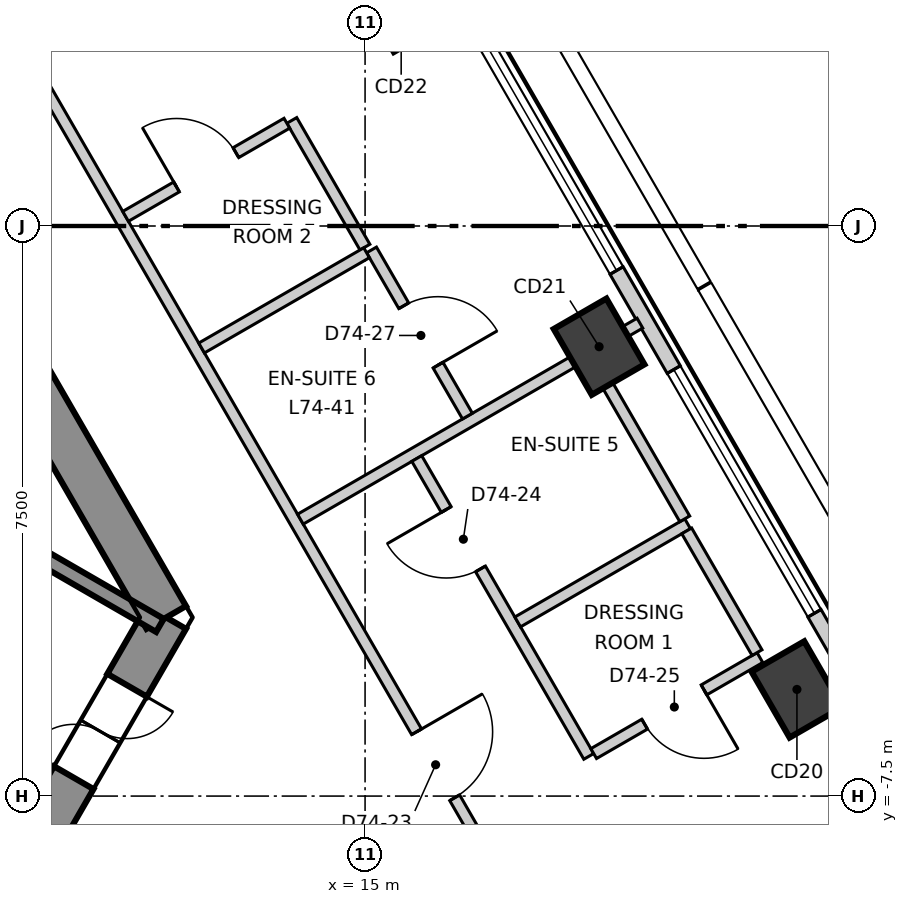
"""IFC4 building model, lengths in metres.
Left out: names, types, materials, properties, quantities, classifications, styles, units other than length and angle.
Written with IfcOpenShell. Run it as: python <this file> out.ifc"""

import sys

from ifc_helpers import new_model, si_unit, direction, frame, frame_2d, origin, origin_2d, place, context, subcontext, project, spatial, polyline, rectangle, outline, extrude, element, fill, save


model = new_model("IFC4")
c1 = context("Model", 3, precision=1e-05, world=origin(), true_north=direction((0.0, 1.0)))
c2 = subcontext(c1, "Body", "Model", "MODEL_VIEW")
j1 = project(units=[si_unit("LENGTHUNIT", "METRE"), si_unit("PLANEANGLEUNIT", "RADIAN")], contexts=[c1])
p1 = place(None, origin())
s1 = spatial("IfcSite", under=j1, at=p1, CompositionType="ELEMENT")
p2 = place(p1, origin())
s2 = spatial("IfcBuilding", under=s1, at=p2, CompositionType="ELEMENT")
p3 = place(p2, frame((0.0, 0.0, 311.5)))
s3 = spatial("IfcBuildingStorey", under=s2, at=p3, CompositionType="ELEMENT", Elevation=311.5)
p4 = place(p3, frame((10.652, -8.15, -0.3), z_axis=(0.0, 0.0, 1.0), x_axis=(0.49997462182, 0.866040055388, 0.0)))
e1 = element("IfcWall", 1, at=p4, inside=s3, PredefinedType="SHEAR", context=c2, shape_type="SweptSolid", body=[
    extrude(outline(polyline([(-0.173, -0.3), (1.732, -0.301), (3.638, -0.301), (3.291, 0.3), (1.732, 0.3), (0.173, 0.3), (-0.173, -0.3)])), origin(), (0.0, 0.0, 1.0), 3.6),
])
p5 = place(p4, frame((1.032, 0.0, 0.3)))
e2 = element("IfcOpeningElement", 2, at=p5, cuts=e1, PredefinedType="OPENING", context=c2, shape_type="SweptSolid", body=[
    extrude(rectangle(XDim=1.4, YDim=2.1, at=frame_2d((0.7, 1.05))), frame((0.0, 0.31, 0.0), z_axis=(0.0, -1.0, 0.0), x_axis=(1.0, 0.0, 0.0)), (0.0, 0.0, 1.0), 0.621),
])
p6 = place(p3, frame((12.384, -5.15, -0.3), z_axis=(0.0, 0.0, 1.0), x_axis=(-0.500000539815, 0.866025092122, 0.0)))
e3 = element("IfcWall", 3, at=p6, inside=s3, PredefinedType="SHEAR", context=c2, shape_type="SweptSolid", body=[
    extrude(outline(polyline([(-0.173, -0.301), (1.795, -0.301), (3.763, -0.301), (5.731, -0.301), (7.7, -0.301), (9.668, -0.301), (11.636, -0.301), (13.604, -0.3), (15.573, -0.3), (17.541, -0.3), (19.509, -0.3), (21.477, -0.3), (21.131, 0.3), (19.226, 0.3), (17.321, 0.3), (15.415, 0.3), (13.51, 0.3), (11.605, 0.3), (9.699, 0.3), (7.794, 0.3), (5.889, 0.3), (3.984, 0.3), (2.078, 0.3), (0.173, 0.3), (-0.173, -0.301)])), origin(), (0.0, 0.0, 1.0), 3.6),
])
p7 = place(p6, frame((16.378, 0.0, 0.3)))
e4 = element("IfcOpeningElement", 4, at=p7, cuts=e3, PredefinedType="OPENING", context=c2, shape_type="SweptSolid", body=[
    extrude(rectangle(XDim=0.9, YDim=2.1, at=frame_2d((0.45, 1.05))), frame((0.0, 0.31, 0.0), z_axis=(0.0, -1.0, 0.0), x_axis=(1.0, 0.0, 0.0)), (0.0, 0.0, 1.0), 0.621),
])
p8 = place(p6, frame((4.026, 0.0, 0.3)))
e5 = element("IfcOpeningElement", 5, at=p8, cuts=e3, PredefinedType="OPENING", context=c2, shape_type="SweptSolid", body=[
    extrude(rectangle(XDim=0.9, YDim=2.1, at=frame_2d((0.45, 1.05))), frame((0.0, 0.31, 0.0), z_axis=(0.0, -1.0, 0.0), x_axis=(1.0, 0.0, 0.0)), (0.0, 0.0, 1.0), 0.621),
])
for number, where, z_axis, x_axis in (
    (6, (20.682, -6.097, -0.3), (0.0, 0.0, 1.0), (-0.5, 0.866, 0.0)),
    (7, (18.079, -1.588, -0.3), (0.0, 0.0, 1.0), (-0.5, 0.866, 0.0)),
):
    element("IfcColumn", number, at=place(p3, frame(where, z_axis=z_axis, x_axis=x_axis)), inside=s3, PredefinedType="COLUMN", context=c2, shape_type="SweptSolid", body=[
        extrude(rectangle(XDim=1.0, YDim=0.8, at=origin_2d()), origin(), (0.0, 0.0, 1.0), 3.6),
    ])
p9 = place(p3, frame((24.544, -11.385, 0.0), z_axis=(0.0, 0.0, 1.0), x_axis=(-0.500002044679, 0.866024223285, 0.0)))
e8 = element("IfcWall", 8, at=p9, inside=s3, PredefinedType="ELEMENTEDWALL", context=c2, shape_type="SweptSolid", body=[
    extrude(rectangle(XDim=44.243, YDim=0.2, at=frame_2d((22.122, 0.0))), origin(), (0.0, 0.0, 1.0), 3.3),
])
p10 = place(p9, frame((2.056, 0.0, 0.9)))
e9 = element("IfcOpeningElement", 9, at=p10, cuts=e8, PredefinedType="OPENING", context=c2, shape_type="SweptSolid", body=[
    extrude(rectangle(XDim=3.7, YDim=2.2, at=frame_2d((1.85, 1.1))), frame((0.0, 0.11, 0.0), z_axis=(0.0, -1.0, 0.0), x_axis=(1.0, 0.0, 0.0)), (0.0, 0.0, 1.0), 0.22),
])
p11 = place(p9, frame((7.264, 0.0, 0.9)))
e10 = element("IfcOpeningElement", 10, at=p11, cuts=e8, PredefinedType="OPENING", context=c2, shape_type="SweptSolid", body=[
    extrude(rectangle(XDim=3.7, YDim=2.2, at=frame_2d((1.85, 1.1))), frame((0.0, 0.11, 0.0), z_axis=(0.0, -1.0, 0.0), x_axis=(1.0, 0.0, 0.0)), (0.0, 0.0, 1.0), 0.22),
])
p12 = place(p9, frame((12.471, 0.0, 0.9)))
e11 = element("IfcOpeningElement", 11, at=p12, cuts=e8, PredefinedType="OPENING", context=c2, shape_type="SweptSolid", body=[
    extrude(rectangle(XDim=3.7, YDim=2.2, at=frame_2d((1.85, 1.1))), frame((0.0, 0.11, 0.0), z_axis=(0.0, -1.0, 0.0), x_axis=(1.0, 0.0, 0.0)), (0.0, 0.0, 1.0), 0.22),
])
p13 = place(p9, frame((17.678, 0.0, 0.9)))
e12 = element("IfcOpeningElement", 12, at=p13, cuts=e8, PredefinedType="OPENING", context=c2, shape_type="SweptSolid", body=[
    extrude(rectangle(XDim=3.7, YDim=2.2, at=frame_2d((1.85, 1.1))), frame((0.0, 0.11, 0.0), z_axis=(0.0, -1.0, 0.0), x_axis=(1.0, 0.0, 0.0)), (0.0, 0.0, 1.0), 0.22),
])
p14 = place(p9, frame((22.885, 0.0, 0.9)))
e13 = element("IfcOpeningElement", 13, at=p14, cuts=e8, PredefinedType="OPENING", context=c2, shape_type="SweptSolid", body=[
    extrude(rectangle(XDim=3.7, YDim=2.2, at=frame_2d((1.85, 1.1))), frame((0.0, 0.11, 0.0), z_axis=(0.0, -1.0, 0.0), x_axis=(1.0, 0.0, 0.0)), (0.0, 0.0, 1.0), 0.22),
])
p15 = place(p9, frame((28.093, 0.0, 0.9)))
e14 = element("IfcOpeningElement", 14, at=p15, cuts=e8, PredefinedType="OPENING", context=c2, shape_type="SweptSolid", body=[
    extrude(rectangle(XDim=3.7, YDim=2.2, at=frame_2d((1.85, 1.1))), frame((0.0, 0.11, 0.0), z_axis=(0.0, -1.0, 0.0), x_axis=(1.0, 0.0, 0.0)), (0.0, 0.0, 1.0), 0.22),
])
p16 = place(p9, frame((33.3, 0.0, 0.9)))
e15 = element("IfcOpeningElement", 15, at=p16, cuts=e8, PredefinedType="OPENING", context=c2, shape_type="SweptSolid", body=[
    extrude(rectangle(XDim=3.7, YDim=2.2, at=frame_2d((1.85, 1.1))), frame((0.0, 0.11, 0.0), z_axis=(0.0, -1.0, 0.0), x_axis=(1.0, 0.0, 0.0)), (0.0, 0.0, 1.0), 0.22),
])
p17 = place(p9, frame((38.507, 0.0, 0.9)))
e16 = element("IfcOpeningElement", 16, at=p17, cuts=e8, PredefinedType="OPENING", context=c2, shape_type="SweptSolid", body=[
    extrude(rectangle(XDim=3.7, YDim=2.2, at=frame_2d((1.85, 1.1))), frame((0.0, 0.11, 0.0), z_axis=(0.0, -1.0, 0.0), x_axis=(1.0, 0.0, 0.0)), (0.0, 0.0, 1.0), 0.22),
])
p18 = place(p3, frame((0.075, 20.37, 0.0), z_axis=(0.0, 0.0, 1.0), x_axis=(0.500006672087, -0.866021551619, 0.0)))
e17 = element("IfcWall", 17, at=p18, inside=s3, PredefinedType="PARTITIONING", context=c2, shape_type="SweptSolid", body=[
    extrude(rectangle(XDim=35.27, YDim=0.15, at=frame_2d((17.635, 0.0))), origin(), (0.0, 0.0, 1.0), 3.3),
])
p19 = place(p18, frame((31.206, 0.0, 0.0)))
e18 = element("IfcOpeningElement", 18, at=p19, cuts=e17, PredefinedType="OPENING", context=c2, shape_type="SweptSolid", body=[
    extrude(rectangle(XDim=1.0, YDim=2.1, at=frame_2d((0.5, 1.05))), frame((0.0, 0.085, 0.0), z_axis=(0.0, -1.0, 0.0), x_axis=(1.0, 0.0, 0.0)), (0.0, 0.0, 1.0), 0.17),
])
p20 = place(p18, frame((19.968, 0.0, 0.0)))
e19 = element("IfcOpeningElement", 19, at=p20, cuts=e17, PredefinedType="OPENING", context=c2, shape_type="SweptSolid", body=[
    extrude(rectangle(XDim=1.0, YDim=2.1, at=frame_2d((0.5, 1.05))), frame((0.0, 0.085, 0.0), z_axis=(0.0, -1.0, 0.0), x_axis=(1.0, 0.0, 0.0)), (0.0, 0.0, 1.0), 0.17),
])
p21 = place(p18, frame((13.353, 0.0, 0.0)))
e20 = element("IfcOpeningElement", 20, at=p21, cuts=e17, PredefinedType="OPENING", context=c2, shape_type="SweptSolid", body=[
    extrude(rectangle(XDim=1.0, YDim=2.1, at=frame_2d((0.5, 1.05))), frame((0.0, 0.085, 0.0), z_axis=(0.0, -1.0, 0.0), x_axis=(1.0, 0.0, 0.0)), (0.0, 0.0, 1.0), 0.17),
])
p22 = place(p18, frame((7.746, 0.0, 0.0)))
e21 = element("IfcOpeningElement", 21, at=p22, cuts=e17, PredefinedType="OPENING", context=c2, shape_type="SweptSolid", body=[
    extrude(rectangle(XDim=1.0, YDim=2.1, at=frame_2d((0.5, 1.05))), frame((0.0, 0.085, 0.0), z_axis=(0.0, -1.0, 0.0), x_axis=(1.0, 0.0, 0.0)), (0.0, 0.0, 1.0), 0.17),
])
p23 = place(p18, frame((3.038, 0.0, 0.0)))
e22 = element("IfcOpeningElement", 22, at=p23, cuts=e17, PredefinedType="OPENING", context=c2, shape_type="SweptSolid", body=[
    extrude(rectangle(XDim=1.0, YDim=2.1, at=frame_2d((0.5, 1.05))), frame((0.0, 0.085, 0.0), z_axis=(0.0, -1.0, 0.0), x_axis=(1.0, 0.0, 0.0)), (0.0, 0.0, 1.0), 0.17),
])
p24 = place(p3, frame((14.149, -3.857, 0.0), z_axis=(0.0, 0.0, 1.0), x_axis=(0.86604134632, 0.499972385701, 0.0)))
e23 = element("IfcWall", 23, at=p24, inside=s3, PredefinedType="PARTITIONING", context=c2, shape_type="SweptSolid", body=[
    extrude(rectangle(XDim=5.158, YDim=0.15, at=frame_2d((2.579, 0.0))), origin(), (0.0, 0.0, 1.0), 3.3),
])
p25 = place(p3, frame((15.085, -0.315, 0.0), z_axis=(0.0, 0.0, 1.0), x_axis=(0.499956887143, -0.866050293573, 0.0)))
e24 = element("IfcWall", 24, at=p25, inside=s3, PredefinedType="PARTITIONING", context=c2, shape_type="SweptSolid", body=[
    extrude(rectangle(XDim=2.524, YDim=0.15, at=frame_2d((1.262, 0.0))), origin(), (0.0, 0.0, 1.0), 3.3),
])
p26 = place(p25, frame((0.849, 0.0, 0.0)))
e25 = element("IfcOpeningElement", 25, at=p26, cuts=e24, PredefinedType="OPENING", context=c2, shape_type="SweptSolid", body=[
    extrude(rectangle(XDim=0.9, YDim=2.1, at=frame_2d((0.45, 1.05))), frame((0.0, 0.085, 0.0), z_axis=(0.0, -1.0, 0.0), x_axis=(1.0, 0.0, 0.0)), (0.0, 0.0, 1.0), 0.17),
])
p27 = place(p3, frame((14.036, 1.389, 0.0), z_axis=(0.0, 0.0, 1.0), x_axis=(0.499890818081, -0.866088430819, 0.0)))
e26 = element("IfcWall", 26, at=p27, inside=s3, PredefinedType="PARTITIONING", context=c2, shape_type="SweptSolid", body=[
    extrude(rectangle(XDim=1.925, YDim=0.15, at=frame_2d((0.962, 0.0))), origin(), (0.0, 0.0, 1.0), 3.3),
])
p28 = place(p3, frame((11.849, 0.127, 0.0), z_axis=(0.0, 0.0, 1.0), x_axis=(0.866014668023, 0.500018594424, 0.0)))
e27 = element("IfcWall", 27, at=p28, inside=s3, PredefinedType="PARTITIONING", context=c2, shape_type="SweptSolid", body=[
    extrude(rectangle(XDim=2.45, YDim=0.15, at=frame_2d((1.225, 0.0))), origin(), (0.0, 0.0, 1.0), 3.3),
])
p29 = place(p28, frame((0.775, 0.0, 0.0)))
e28 = element("IfcOpeningElement", 28, at=p29, cuts=e27, PredefinedType="OPENING", context=c2, shape_type="SweptSolid", body=[
    extrude(rectangle(XDim=0.9, YDim=2.1, at=frame_2d((0.45, 1.05))), frame((0.0, 0.085, 0.0), z_axis=(0.0, -1.0, 0.0), x_axis=(1.0, 0.0, 0.0)), (0.0, 0.0, 1.0), 0.17),
])
p30 = place(p3, frame((12.849, -1.605, 0.0), z_axis=(0.0, 0.0, 1.0), x_axis=(0.866101252082, 0.499868603878, 0.0)))
e29 = element("IfcWall", 29, at=p30, inside=s3, PredefinedType="PARTITIONING", context=c2, shape_type="SweptSolid", body=[
    extrude(rectangle(XDim=2.507, YDim=0.15, at=frame_2d((1.253, 0.0))), origin(), (0.0, 0.0, 1.0), 3.3),
])
p31 = place(p3, frame((15.68, -3.059, 0.0), z_axis=(0.0, 0.0, 1.0), x_axis=(0.500096029888, -0.865969953804, 0.0)))
e30 = element("IfcWall", 30, at=p31, inside=s3, PredefinedType="PARTITIONING", context=c2, shape_type="SweptSolid", body=[
    extrude(rectangle(XDim=4.525, YDim=0.15, at=frame_2d((2.263, 0.0))), origin(), (0.0, 0.0, 1.0), 3.3),
])
p32 = place(p31, frame((0.776, 0.0, 0.0)))
e31 = element("IfcOpeningElement", 31, at=p32, cuts=e30, PredefinedType="OPENING", context=c2, shape_type="SweptSolid", body=[
    extrude(rectangle(XDim=0.9, YDim=2.1, at=frame_2d((0.45, 1.05))), frame((0.0, 0.085, 0.0), z_axis=(0.0, -1.0, 0.0), x_axis=(1.0, 0.0, 0.0)), (0.0, 0.0, 1.0), 0.17),
])
p33 = place(p3, frame((17.008, -5.209, 0.0), z_axis=(0.0, 0.0, 1.0), x_axis=(0.865999760466, 0.500044412901, 0.0)))
e32 = element("IfcWall", 32, at=p33, inside=s3, PredefinedType="PARTITIONING", context=c2, shape_type="SweptSolid", body=[
    extrude(rectangle(XDim=2.582, YDim=0.15, at=frame_2d((1.291, 0.0))), origin(), (0.0, 0.0, 1.0), 3.3),
])
p34 = place(p3, frame((18.008, -6.941, 0.0), z_axis=(0.0, 0.0, 1.0), x_axis=(0.865979509711, 0.500079482444, 0.0)))
e33 = element("IfcWall", 33, at=p34, inside=s3, PredefinedType="PARTITIONING", context=c2, shape_type="SweptSolid", body=[
    extrude(rectangle(XDim=2.525, YDim=0.15, at=frame_2d((1.263, 0.0))), origin(), (0.0, 0.0, 1.0), 3.3),
])
p35 = place(p34, frame((0.775, 0.0, 0.0)))
e34 = element("IfcOpeningElement", 34, at=p35, cuts=e33, PredefinedType="OPENING", context=c2, shape_type="SweptSolid", body=[
    extrude(rectangle(XDim=0.9, YDim=2.1, at=frame_2d((0.45, 1.05))), frame((0.0, 0.085, 0.0), z_axis=(0.0, -1.0, 0.0), x_axis=(1.0, 0.0, 0.0)), (0.0, 0.0, 1.0), 0.17),
])
p36 = place(p3, frame((19.232, -4.011, 0.0), z_axis=(0.0, 0.0, 1.0), x_axis=(0.500042316284, -0.866000971088, 0.0)))
e35 = element("IfcWall", 35, at=p36, inside=s3, PredefinedType="PARTITIONING", context=c2, shape_type="SweptSolid", body=[
    extrude(rectangle(XDim=1.85, YDim=0.15, at=frame_2d((0.925, 0.0))), origin(), (0.0, 0.0, 1.0), 2.6),
])
p37 = place(p3, frame((17.981, -1.731, 0.0), z_axis=(0.0, 0.0, 1.0), x_axis=(0.499975448907, -0.8660395779, 0.0)))
e36 = element("IfcWall", 36, at=p37, inside=s3, PredefinedType="PARTITIONING", context=c2, shape_type="SweptSolid", body=[
    extrude(rectangle(XDim=2.45, YDim=0.15, at=frame_2d((1.225, 0.0))), origin(), (0.0, 0.0, 1.0), 2.6),
])
p38 = place(p3, frame((6.529, -1.922, 0.0), z_axis=(0.0, 0.0, 1.0), x_axis=(0.866068467981, -0.499925403204, 0.0)))
e37 = element("IfcWall", 37, at=p38, inside=s3, PredefinedType="SOLIDWALL", context=c2, shape_type="SweptSolid", body=[
    extrude(rectangle(XDim=6.665, YDim=0.2, at=frame_2d((3.332, 0.0))), origin(), (0.0, 0.0, 1.0), 3.3),
])
p39 = place(p11, origin())
e38 = element("IfcWindow", 38, at=p39, inside=s3, PartitioningType="SINGLE_PANEL", PredefinedType="WINDOW", context=c2, shape_type="SweptSolid", body=[
    extrude(rectangle(XDim=3.7, YDim=2.2, at=frame_2d((1.85, 1.1))), frame((0.0, 0.03, 0.0), z_axis=(0.0, -1.0, 0.0), x_axis=(1.0, 0.0, 0.0)), (0.0, 0.0, 1.0), 0.06),
])
fill(e10, e38)
p40 = place(p12, origin())
e39 = element("IfcWindow", 39, at=p40, inside=s3, PartitioningType="SINGLE_PANEL", PredefinedType="WINDOW", context=c2, shape_type="SweptSolid", body=[
    extrude(rectangle(XDim=3.7, YDim=2.2, at=frame_2d((1.85, 1.1))), frame((0.0, 0.03, 0.0), z_axis=(0.0, -1.0, 0.0), x_axis=(1.0, 0.0, 0.0)), (0.0, 0.0, 1.0), 0.06),
])
fill(e11, e39)
p41 = place(p19, origin())
e40 = element("IfcDoor", 40, at=p41, inside=s3, OperationType="SINGLE_SWING_RIGHT", PredefinedType="DOOR", context=c2, shape_type="SweptSolid", body=[
    extrude(rectangle(XDim=1.0, YDim=2.1, at=frame_2d((0.5, 1.05))), frame((0.0, 0.025, 0.0), z_axis=(0.0, -1.0, 0.0), x_axis=(1.0, 0.0, 0.0)), (0.0, 0.0, 1.0), 0.05),
])
fill(e18, e40)
p42 = place(p32, origin())
e41 = element("IfcDoor", 41, at=p42, inside=s3, OperationType="SINGLE_SWING_LEFT", PredefinedType="DOOR", context=c2, shape_type="SweptSolid", body=[
    extrude(rectangle(XDim=0.9, YDim=2.1, at=frame_2d((0.45, 1.05))), frame((0.0, 0.025, 0.0), z_axis=(0.0, -1.0, 0.0), x_axis=(1.0, 0.0, 0.0)), (0.0, 0.0, 1.0), 0.05),
])
fill(e31, e41)
p43 = place(p35, origin())
e42 = element("IfcDoor", 42, at=p43, inside=s3, OperationType="SINGLE_SWING_RIGHT", PredefinedType="DOOR", context=c2, shape_type="SweptSolid", body=[
    extrude(rectangle(XDim=0.9, YDim=2.1, at=frame_2d((0.45, 1.05))), frame((0.0, 0.025, 0.0), z_axis=(0.0, -1.0, 0.0), x_axis=(1.0, 0.0, 0.0)), (0.0, 0.0, 1.0), 0.05),
])
fill(e34, e42)
p44 = place(p26, origin())
e43 = element("IfcDoor", 43, at=p44, inside=s3, OperationType="SINGLE_SWING_LEFT", PredefinedType="DOOR", context=c2, shape_type="SweptSolid", body=[
    extrude(rectangle(XDim=0.9, YDim=2.1, at=frame_2d((0.45, 1.05))), frame((0.0, 0.025, 0.0), z_axis=(0.0, -1.0, 0.0), x_axis=(1.0, 0.0, 0.0)), (0.0, 0.0, 1.0), 0.05),
])
fill(e25, e43)
p45 = place(p29, origin())
e44 = element("IfcDoor", 44, at=p45, inside=s3, OperationType="SINGLE_SWING_RIGHT", PredefinedType="DOOR", context=c2, shape_type="SweptSolid", body=[
    extrude(rectangle(XDim=0.9, YDim=2.1, at=frame_2d((0.45, 1.05))), frame((0.0, 0.025, 0.0), z_axis=(0.0, -1.0, 0.0), x_axis=(1.0, 0.0, 0.0)), (0.0, 0.0, 1.0), 0.05),
])
fill(e28, e44)
p46 = place(p5, origin())
e45 = element("IfcDoor", 45, at=p46, inside=s3, OperationType="DOUBLE_DOOR_SINGLE_SWING", PredefinedType="DOOR", context=c2, shape_type="SweptSolid", body=[
    extrude(rectangle(XDim=1.4, YDim=2.1, at=frame_2d((0.7, 1.05))), frame((0.0, 0.025, 0.0), z_axis=(0.0, -1.0, 0.0), x_axis=(1.0, 0.0, 0.0)), (0.0, 0.0, 1.0), 0.05),
])
fill(e2, e45)
save(model, sys.argv[1])
